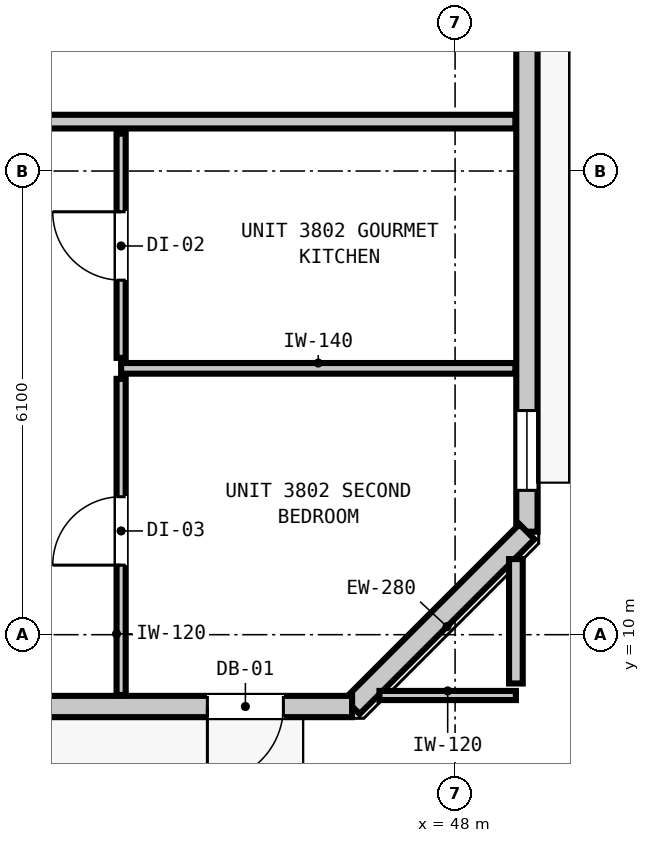
"""IFC4 building model, lengths in metres.
Left out: names, types, materials, properties, quantities, classifications, styles, units other than length and angle.
Written with IfcOpenShell. Run it as: python <this file> out.ifc"""

import sys

from ifc_helpers import new_model, si_unit, direction, frame, frame_2d, origin, place, context, subcontext, project, spatial, rectangle, extrude, element, fill, save


model = new_model("IFC4")
c1 = context("Model", 3, precision=1e-05, world=origin(), true_north=direction((0.0, 1.0)))
c2 = subcontext(c1, "Body", "Model", "MODEL_VIEW")
j1 = project(units=[si_unit("LENGTHUNIT", "METRE"), si_unit("PLANEANGLEUNIT", "RADIAN")], contexts=[c1])
p1 = place(None, origin())
s1 = spatial("IfcSite", under=j1, at=p1, CompositionType="ELEMENT")
p2 = place(p1, origin())
s2 = spatial("IfcBuilding", under=s1, at=p2, CompositionType="ELEMENT")
p3 = place(p2, frame((0.0, 0.0, 132.64)))
s3 = spatial("IfcBuildingStorey", under=s2, at=p3, CompositionType="ELEMENT", Elevation=132.64)
p4 = place(p3, frame((48.945, 43.645, 0.0), z_axis=(0.0, 0.0, 1.0), x_axis=(0.0, -1.0, 0.0)))
e1 = element("IfcWall", 1, at=p4, inside=s3, PredefinedType="STANDARD", context=c2, shape_type="SweptSolid", body=[
    extrude(rectangle(XDim=32.29, YDim=0.28, at=frame_2d((16.145, 0.0))), origin(), (0.0, 0.0, 1.0), 3.08),
])
p5 = place(p4, frame((5.467, 0.0, 0.0)))
e2 = element("IfcOpeningElement", 2, at=p5, cuts=e1, PredefinedType="OPENING", context=c2, shape_type="SweptSolid", body=[
    extrude(rectangle(XDim=1.0, YDim=2.15, at=frame_2d((0.5, 1.075))), frame((0.0, 0.15, 0.0), z_axis=(0.0, -1.0, 0.0), x_axis=(1.0, 0.0, 0.0)), (0.0, 0.0, 1.0), 0.3),
])
p6 = place(p4, frame((30.696, 0.0, 0.85)))
e3 = element("IfcOpeningElement", 3, at=p6, cuts=e1, PredefinedType="OPENING", context=c2, shape_type="SweptSolid", body=[
    extrude(rectangle(XDim=1.05, YDim=1.65, at=frame_2d((0.525, 0.825))), frame((0.0, 0.15, 0.0), z_axis=(0.0, -1.0, 0.0), x_axis=(1.0, 0.0, 0.0)), (0.0, 0.0, 1.0), 0.3),
])
p7 = place(p4, frame((14.611, 0.0, 0.85)))
e4 = element("IfcOpeningElement", 4, at=p7, cuts=e1, PredefinedType="OPENING", context=c2, shape_type="SweptSolid", body=[
    extrude(rectangle(XDim=2.1, YDim=1.9, at=frame_2d((1.05, 0.95))), frame((0.0, 0.15, 0.0), z_axis=(0.0, -1.0, 0.0), x_axis=(1.0, 0.0, 0.0)), (0.0, 0.0, 1.0), 0.3),
])
p8 = place(p4, frame((7.106, 0.0, 0.85)))
e5 = element("IfcOpeningElement", 5, at=p8, cuts=e1, PredefinedType="OPENING", context=c2, shape_type="SweptSolid", body=[
    extrude(rectangle(XDim=1.05, YDim=1.65, at=frame_2d((0.525, 0.825))), frame((0.0, 0.15, 0.0), z_axis=(0.0, -1.0, 0.0), x_axis=(1.0, 0.0, 0.0)), (0.0, 0.0, 1.0), 0.3),
])
p9 = place(p3, frame((48.945, 11.355, 0.0), z_axis=(0.0, 0.0, 1.0), x_axis=(-0.707106781187, -0.707106781187, 0.0)))
e6 = element("IfcWall", 6, at=p9, inside=s3, PredefinedType="STANDARD", context=c2, shape_type="SweptSolid", body=[
    extrude(rectangle(XDim=3.253, YDim=0.28, at=frame_2d((1.626, 0.0))), origin(), (0.0, 0.0, 1.0), 3.08),
])
p10 = place(p3, frame((46.645, 9.055, 0.0), z_axis=(0.0, 0.0, 1.0), x_axis=(-1.0, 0.0, 0.0)))
e7 = element("IfcWall", 7, at=p10, inside=s3, PredefinedType="STANDARD", context=c2, shape_type="SweptSolid", body=[
    extrude(rectangle(XDim=35.09, YDim=0.28, at=frame_2d((17.545, 0.0))), origin(), (0.0, 0.0, 1.0), 3.08),
])
p11 = place(p10, frame((0.904, 0.0, 0.0)))
e8 = element("IfcOpeningElement", 8, at=p11, cuts=e7, PredefinedType="OPENING", context=c2, shape_type="SweptSolid", body=[
    extrude(rectangle(XDim=1.0, YDim=2.15, at=frame_2d((0.5, 1.075))), frame((0.0, 0.15, 0.0), z_axis=(0.0, -1.0, 0.0), x_axis=(1.0, 0.0, 0.0)), (0.0, 0.0, 1.0), 0.3),
])
p12 = place(p10, frame((27.955, 0.0, 0.85)))
e9 = element("IfcOpeningElement", 9, at=p12, cuts=e7, PredefinedType="OPENING", context=c2, shape_type="SweptSolid", body=[
    extrude(rectangle(XDim=2.1, YDim=1.9, at=frame_2d((1.05, 0.95))), frame((0.0, 0.15, 0.0), z_axis=(0.0, -1.0, 0.0), x_axis=(1.0, 0.0, 0.0)), (0.0, 0.0, 1.0), 0.3),
])
p13 = place(p10, frame((34.133, 0.0, 0.85)))
e10 = element("IfcOpeningElement", 10, at=p13, cuts=e7, PredefinedType="OPENING", context=c2, shape_type="SweptSolid", body=[
    extrude(rectangle(XDim=0.58, YDim=1.5, at=frame_2d((0.29, 0.75))), frame((0.0, 0.15, 0.0), z_axis=(0.0, -1.0, 0.0), x_axis=(1.0, 0.0, 0.0)), (0.0, 0.0, 1.0), 0.3),
])
p14 = place(p10, frame((20.595, 0.0, 0.85)))
e11 = element("IfcOpeningElement", 11, at=p14, cuts=e7, PredefinedType="OPENING", context=c2, shape_type="SweptSolid", body=[
    extrude(rectangle(XDim=2.1, YDim=1.9, at=frame_2d((1.05, 0.95))), frame((0.0, 0.15, 0.0), z_axis=(0.0, -1.0, 0.0), x_axis=(1.0, 0.0, 0.0)), (0.0, 0.0, 1.0), 0.3),
])
p15 = place(p10, frame((15.248, 0.0, 0.85)))
e12 = element("IfcOpeningElement", 12, at=p15, cuts=e7, PredefinedType="OPENING", context=c2, shape_type="SweptSolid", body=[
    extrude(rectangle(XDim=1.05, YDim=1.65, at=frame_2d((0.525, 0.825))), frame((0.0, 0.15, 0.0), z_axis=(0.0, -1.0, 0.0), x_axis=(1.0, 0.0, 0.0)), (0.0, 0.0, 1.0), 0.3),
])
p16 = place(p10, frame((4.752, 0.0, 0.85)))
e13 = element("IfcOpeningElement", 13, at=p16, cuts=e7, PredefinedType="OPENING", context=c2, shape_type="SweptSolid", body=[
    extrude(rectangle(XDim=2.1, YDim=1.9, at=frame_2d((1.05, 0.95))), frame((0.0, 0.15, 0.0), z_axis=(0.0, -1.0, 0.0), x_axis=(1.0, 0.0, 0.0)), (0.0, 0.0, 1.0), 0.3),
])
p17 = place(p10, frame((11.573, 0.0, 0.85)))
e14 = element("IfcOpeningElement", 14, at=p17, cuts=e7, PredefinedType="OPENING", context=c2, shape_type="SweptSolid", body=[
    extrude(rectangle(XDim=2.1, YDim=1.9, at=frame_2d((1.05, 0.95))), frame((0.0, 0.15, 0.0), z_axis=(0.0, -1.0, 0.0), x_axis=(1.0, 0.0, 0.0)), (0.0, 0.0, 1.0), 0.3),
])
p18 = place(p3, frame((9.407, 16.75, 0.0), z_axis=(0.0, 0.0, 1.0), x_axis=(1.0, 0.0, 0.0)))
e15 = element("IfcWall", 15, at=p18, inside=s3, PredefinedType="PARTITIONING", context=c2, shape_type="SweptSolid", body=[
    extrude(rectangle(XDim=39.386, YDim=0.18, at=frame_2d((19.693, 0.0))), origin(), (0.0, 0.0, 1.0), 3.08),
])
p19 = place(p18, frame((8.773, 0.0, 0.0)))
e16 = element("IfcOpeningElement", 16, at=p19, cuts=e15, PredefinedType="OPENING", context=c2, shape_type="SweptSolid", body=[
    extrude(rectangle(XDim=1.0, YDim=2.15, at=frame_2d((0.5, 1.075))), frame((0.0, 0.1, 0.0), z_axis=(0.0, -1.0, 0.0), x_axis=(1.0, 0.0, 0.0)), (0.0, 0.0, 1.0), 0.2),
])
p20 = place(p18, frame((30.936, 0.0, 0.0)))
e17 = element("IfcOpeningElement", 17, at=p20, cuts=e15, PredefinedType="OPENING", context=c2, shape_type="SweptSolid", body=[
    extrude(rectangle(XDim=1.0, YDim=2.15, at=frame_2d((0.5, 1.075))), frame((0.0, 0.1, 0.0), z_axis=(0.0, -1.0, 0.0), x_axis=(1.0, 0.0, 0.0)), (0.0, 0.0, 1.0), 0.2),
])
p21 = place(p3, frame((43.606, 13.504, 0.0), z_axis=(0.0, 0.0, 1.0), x_axis=(1.0, 0.0, 0.0)))
e18 = element("IfcWall", 18, at=p21, inside=s3, PredefinedType="PARTITIONING", context=c2, shape_type="SweptSolid", body=[
    extrude(rectangle(XDim=5.187, YDim=0.14, at=frame_2d((2.594, 0.0))), origin(), (0.0, 0.0, 1.0), 3.08),
])
p22 = place(p3, frame((47.005, 9.2, 0.0), z_axis=(0.0, 0.0, 1.0), x_axis=(1.0, 0.0, 0.0)))
e19 = element("IfcWall", 19, at=p22, inside=s3, PredefinedType="PARTITIONING", context=c2, shape_type="SweptSolid", body=[
    extrude(rectangle(XDim=1.795, YDim=0.12, at=frame_2d((0.897, 0.0))), origin(), (0.0, 0.0, 1.0), 3.08),
])
p23 = place(p3, frame((48.8, 9.358, 0.0), z_axis=(0.0, 0.0, 1.0), x_axis=(0.0, 1.0, 0.0)))
e20 = element("IfcWall", 20, at=p23, inside=s3, PredefinedType="PARTITIONING", context=c2, shape_type="SweptSolid", body=[
    extrude(rectangle(XDim=1.637, YDim=0.18, at=frame_2d((0.819, 0.0))), origin(), (0.0, 0.0, 1.0), 3.08),
])
p24 = place(p3, frame((43.606, 9.207, 0.0), z_axis=(0.0, 0.0, 1.0), x_axis=(0.0, 1.0, 0.0)))
e21 = element("IfcWall", 21, at=p24, inside=s3, PredefinedType="PARTITIONING", context=c2, shape_type="SweptSolid", body=[
    extrude(rectangle(XDim=4.159, YDim=0.12, at=frame_2d((2.08, 0.0))), origin(), (0.0, 0.0, 1.0), 3.08),
])
p25 = place(p24, frame((1.708, 0.0, 0.0)))
e22 = element("IfcOpeningElement", 22, at=p25, cuts=e21, PredefinedType="OPENING", context=c2, shape_type="SweptSolid", body=[
    extrude(rectangle(XDim=0.9, YDim=2.1, at=frame_2d((0.45, 1.05))), frame((0.0, 0.07, 0.0), z_axis=(0.0, -1.0, 0.0), x_axis=(1.0, 0.0, 0.0)), (0.0, 0.0, 1.0), 0.14),
])
p26 = place(p3, frame((43.606, 13.642, 0.0), z_axis=(0.0, 0.0, 1.0), x_axis=(0.0, 1.0, 0.0)))
e23 = element("IfcWall", 23, at=p26, inside=s3, PredefinedType="PARTITIONING", context=c2, shape_type="SweptSolid", body=[
    extrude(rectangle(XDim=2.95, YDim=0.12, at=frame_2d((1.475, 0.0))), origin(), (0.0, 0.0, 1.0), 3.08),
])
p27 = place(p26, frame((1.022, 0.0, 0.0)))
e24 = element("IfcOpeningElement", 24, at=p27, cuts=e23, PredefinedType="OPENING", context=c2, shape_type="SweptSolid", body=[
    extrude(rectangle(XDim=0.9, YDim=2.1, at=frame_2d((0.45, 1.05))), frame((0.0, 0.07, 0.0), z_axis=(0.0, -1.0, 0.0), x_axis=(1.0, 0.0, 0.0)), (0.0, 0.0, 1.0), 0.14),
])
p28 = place(p11, origin())
e25 = element("IfcDoor", 25, at=p28, inside=s3, OperationType="SINGLE_SWING_RIGHT", PredefinedType="DOOR", context=c2, shape_type="SweptSolid", body=[
    extrude(rectangle(XDim=1.0, YDim=2.15, at=frame_2d((0.5, 1.075))), frame((0.0, 0.025, 0.0), z_axis=(0.0, -1.0, 0.0), x_axis=(1.0, 0.0, 0.0)), (0.0, 0.0, 1.0), 0.05),
])
fill(e8, e25)
p29 = place(p6, origin())
e26 = element("IfcWindow", 26, at=p29, inside=s3, PartitioningType="SINGLE_PANEL", PredefinedType="WINDOW", context=c2, shape_type="SweptSolid", body=[
    extrude(rectangle(XDim=1.05, YDim=1.65, at=frame_2d((0.525, 0.825))), frame((0.0, 0.03, 0.0), z_axis=(0.0, -1.0, 0.0), x_axis=(1.0, 0.0, 0.0)), (0.0, 0.0, 1.0), 0.06),
])
fill(e3, e26)
p30 = place(p27, origin())
e27 = element("IfcDoor", 27, at=p30, inside=s3, OperationType="SINGLE_SWING_RIGHT", PredefinedType="DOOR", context=c2, shape_type="SweptSolid", body=[
    extrude(rectangle(XDim=0.9, YDim=2.1, at=frame_2d((0.45, 1.05))), frame((0.0, 0.025, 0.0), z_axis=(0.0, -1.0, 0.0), x_axis=(1.0, 0.0, 0.0)), (0.0, 0.0, 1.0), 0.05),
])
fill(e24, e27)
p31 = place(p25, origin())
e28 = element("IfcDoor", 28, at=p31, inside=s3, OperationType="SINGLE_SWING_LEFT", PredefinedType="DOOR", context=c2, shape_type="SweptSolid", body=[
    extrude(rectangle(XDim=0.9, YDim=2.1, at=frame_2d((0.45, 1.05))), frame((0.0, 0.025, 0.0), z_axis=(0.0, -1.0, 0.0), x_axis=(1.0, 0.0, 0.0)), (0.0, 0.0, 1.0), 0.05),
])
fill(e22, e28)
save(model, sys.argv[1])
